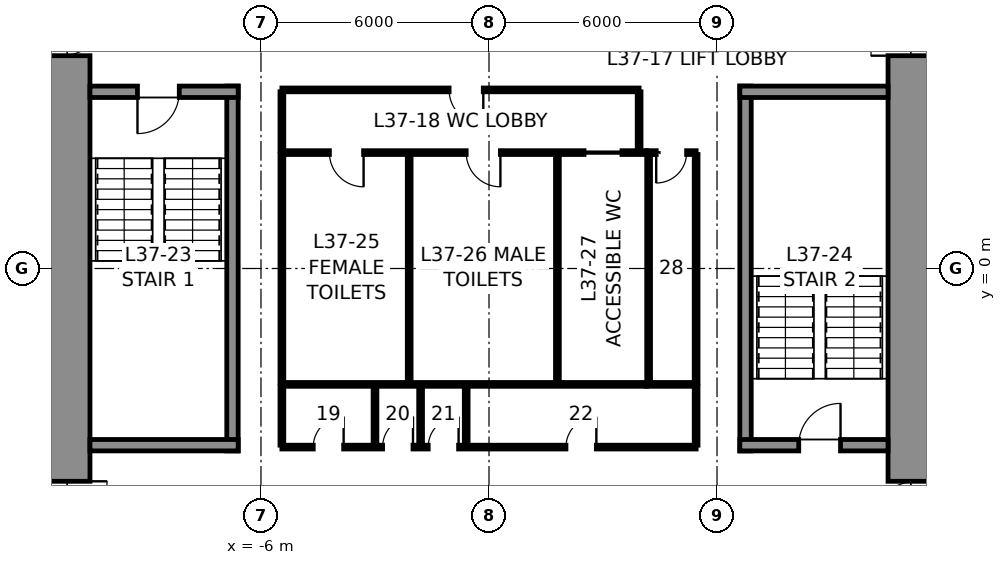
"""IFC4 building model, lengths in metres.
Left out: names, types, materials, properties, quantities, classifications, styles, units other than length and angle.
Written with IfcOpenShell. Run it as: python <this file> out.ifc"""

import sys

from ifc_helpers import new_model, si_unit, direction, frame, frame_2d, origin, place, context, subcontext, project, spatial, rectangle, extrude, element, fill, save


model = new_model("IFC4")
c1 = context("Model", 3, precision=1e-05, world=origin(), true_north=direction((0.0, 1.0)))
c2 = subcontext(c1, "Body", "Model", "MODEL_VIEW")
j1 = project(units=[si_unit("LENGTHUNIT", "METRE"), si_unit("PLANEANGLEUNIT", "RADIAN")], contexts=[c1])
p1 = place(None, origin())
s1 = spatial("IfcSite", under=j1, at=p1, CompositionType="ELEMENT")
p2 = place(p1, origin())
s2 = spatial("IfcBuilding", under=s1, at=p2, CompositionType="ELEMENT")
p3 = place(p2, frame((0.0, 0.0, 175.8)))
s3 = spatial("IfcBuildingStorey", under=s2, at=p3, CompositionType="ELEMENT", Elevation=175.8)
p4 = place(p3, frame((11.25, 10.5, 0.0), z_axis=(0.0, 0.0, 1.0), x_axis=(0.0, -1.0, 0.0)))
e1 = element("IfcWall", 1, at=p4, inside=s3, PredefinedType="SHEAR", context=c2, shape_type="SweptSolid", body=[
    extrude(rectangle(XDim=21.0, YDim=1.5, at=frame_2d((10.5, 0.0))), origin(), (0.0, 0.0, 1.0), 4.0),
])
p5 = place(p4, frame((3.7, 0.0, 0.0)))
e2 = element("IfcOpeningElement", 2, at=p5, cuts=e1, PredefinedType="OPENING", context=c2, shape_type="SweptSolid", body=[
    extrude(rectangle(XDim=1.2, YDim=2.3, at=frame_2d((0.6, 1.15))), frame((0.0, 0.76, 0.0), z_axis=(0.0, -1.0, 0.0), x_axis=(1.0, 0.0, 0.0)), (0.0, 0.0, 1.0), 1.52),
])
p6 = place(p4, frame((16.1, 0.0, 0.0)))
e3 = element("IfcOpeningElement", 3, at=p6, cuts=e1, PredefinedType="OPENING", context=c2, shape_type="SweptSolid", body=[
    extrude(rectangle(XDim=1.2, YDim=2.3, at=frame_2d((0.6, 1.15))), frame((0.0, 0.76, 0.0), z_axis=(0.0, -1.0, 0.0), x_axis=(1.0, 0.0, 0.0)), (0.0, 0.0, 1.0), 1.52),
])
p7 = place(p3, frame((-11.25, -10.5, 0.0), z_axis=(0.0, 0.0, 1.0), x_axis=(0.0, 1.0, 0.0)))
e4 = element("IfcWall", 4, at=p7, inside=s3, PredefinedType="SHEAR", context=c2, shape_type="SweptSolid", body=[
    extrude(rectangle(XDim=21.0, YDim=1.5, at=frame_2d((10.5, 0.0))), origin(), (0.0, 0.0, 1.0), 4.0),
])
p8 = place(p7, frame((16.1, 0.0, 0.0)))
e5 = element("IfcOpeningElement", 5, at=p8, cuts=e4, PredefinedType="OPENING", context=c2, shape_type="SweptSolid", body=[
    extrude(rectangle(XDim=1.2, YDim=2.3, at=frame_2d((0.6, 1.15))), frame((0.0, 0.76, 0.0), z_axis=(0.0, -1.0, 0.0), x_axis=(1.0, 0.0, 0.0)), (0.0, 0.0, 1.0), 1.52),
])
p9 = place(p7, frame((3.7, 0.0, 0.0)))
e6 = element("IfcOpeningElement", 6, at=p9, cuts=e4, PredefinedType="OPENING", context=c2, shape_type="SweptSolid", body=[
    extrude(rectangle(XDim=1.2, YDim=2.3, at=frame_2d((0.6, 1.15))), frame((0.0, 0.76, 0.0), z_axis=(0.0, -1.0, 0.0), x_axis=(1.0, 0.0, 0.0)), (0.0, 0.0, 1.0), 1.52),
])
p10 = place(p3, frame((-6.75, -4.8, 0.0), z_axis=(0.0, 0.0, 1.0), x_axis=(0.0, 1.0, 0.0)))
e7 = element("IfcWall", 7, at=p10, inside=s3, PredefinedType="SOLIDWALL", context=c2, shape_type="SweptSolid", body=[
    extrude(rectangle(XDim=9.6, YDim=0.3, at=frame_2d((4.8, 0.0))), origin(), (0.0, 0.0, 1.0), 3.75),
])
p11 = place(p3, frame((-10.5, 4.65, 0.0), z_axis=(0.0, 0.0, 1.0), x_axis=(1.0, 0.0, 0.0)))
e8 = element("IfcWall", 8, at=p11, inside=s3, PredefinedType="SOLIDWALL", context=c2, shape_type="SweptSolid", body=[
    extrude(rectangle(XDim=3.9, YDim=0.3, at=frame_2d((1.95, 0.0))), origin(), (0.0, 0.0, 1.0), 3.75),
])
p12 = place(p11, frame((1.25, 0.0, 0.0)))
e9 = element("IfcOpeningElement", 9, at=p12, cuts=e8, PredefinedType="OPENING", context=c2, shape_type="SweptSolid", body=[
    extrude(rectangle(XDim=1.1, YDim=2.3, at=frame_2d((0.55, 1.15))), frame((0.0, 0.16, 0.0), z_axis=(0.0, -1.0, 0.0), x_axis=(1.0, 0.0, 0.0)), (0.0, 0.0, 1.0), 0.32),
])
p13 = place(p3, frame((-6.6, -4.65, 0.0), z_axis=(0.0, 0.0, 1.0), x_axis=(-1.0, 0.0, 0.0)))
e10 = element("IfcWall", 10, at=p13, inside=s3, PredefinedType="SOLIDWALL", context=c2, shape_type="SweptSolid", body=[
    extrude(rectangle(XDim=3.9, YDim=0.3, at=frame_2d((1.95, 0.0))), origin(), (0.0, 0.0, 1.0), 3.75),
])
p14 = place(p3, frame((6.75, -4.8, 0.0), z_axis=(0.0, 0.0, 1.0), x_axis=(0.0, 1.0, 0.0)))
e11 = element("IfcWall", 11, at=p14, inside=s3, PredefinedType="SOLIDWALL", context=c2, shape_type="SweptSolid", body=[
    extrude(rectangle(XDim=9.6, YDim=0.3, at=frame_2d((4.8, 0.0))), origin(), (0.0, 0.0, 1.0), 3.75),
])
p15 = place(p3, frame((6.6, 4.65, 0.0), z_axis=(0.0, 0.0, 1.0), x_axis=(1.0, 0.0, 0.0)))
e12 = element("IfcWall", 12, at=p15, inside=s3, PredefinedType="SOLIDWALL", context=c2, shape_type="SweptSolid", body=[
    extrude(rectangle(XDim=3.9, YDim=0.3, at=frame_2d((1.95, 0.0))), origin(), (0.0, 0.0, 1.0), 3.75),
])
p16 = place(p3, frame((10.5, -4.65, 0.0), z_axis=(0.0, 0.0, 1.0), x_axis=(-1.0, 0.0, 0.0)))
e13 = element("IfcWall", 13, at=p16, inside=s3, PredefinedType="SOLIDWALL", context=c2, shape_type="SweptSolid", body=[
    extrude(rectangle(XDim=3.9, YDim=0.3, at=frame_2d((1.95, 0.0))), origin(), (0.0, 0.0, 1.0), 3.75),
])
p17 = place(p16, frame((1.25, 0.0, 0.0)))
e14 = element("IfcOpeningElement", 14, at=p17, cuts=e13, PredefinedType="OPENING", context=c2, shape_type="SweptSolid", body=[
    extrude(rectangle(XDim=1.1, YDim=2.3, at=frame_2d((0.55, 1.15))), frame((0.0, 0.16, 0.0), z_axis=(0.0, -1.0, 0.0), x_axis=(1.0, 0.0, 0.0)), (0.0, 0.0, 1.0), 0.32),
])
p18 = place(p3, frame((-5.45, 3.05, 0.0), z_axis=(0.0, 0.0, 1.0), x_axis=(1.0, 0.0, 0.0)))
e15 = element("IfcWall", 15, at=p18, inside=s3, PredefinedType="PARTITIONING", context=c2, shape_type="SweptSolid", body=[
    extrude(rectangle(XDim=9.6, YDim=0.1, at=frame_2d((4.8, 0.0))), origin(), (0.0, 0.0, 1.0), 3.75),
])
p19 = place(p18, frame((1.25, 0.0, 0.0)))
e16 = element("IfcOpeningElement", 16, at=p19, cuts=e15, PredefinedType="OPENING", context=c2, shape_type="SweptSolid", body=[
    extrude(rectangle(XDim=0.9, YDim=2.3, at=frame_2d((0.45, 1.15))), frame((0.0, 0.06, 0.0), z_axis=(0.0, -1.0, 0.0), x_axis=(1.0, 0.0, 0.0)), (0.0, 0.0, 1.0), 0.12),
])
p20 = place(p18, frame((4.85, 0.0, 0.0)))
e17 = element("IfcOpeningElement", 17, at=p20, cuts=e15, PredefinedType="OPENING", context=c2, shape_type="SweptSolid", body=[
    extrude(rectangle(XDim=0.9, YDim=2.3, at=frame_2d((0.45, 1.15))), frame((0.0, 0.06, 0.0), z_axis=(0.0, -1.0, 0.0), x_axis=(1.0, 0.0, 0.0)), (0.0, 0.0, 1.0), 0.12),
])
p21 = place(p18, frame((7.95, 0.0, 0.0)))
e18 = element("IfcOpeningElement", 18, at=p21, cuts=e15, PredefinedType="OPENING", context=c2, shape_type="SweptSolid", body=[
    extrude(rectangle(XDim=1.0, YDim=2.3, at=frame_2d((0.5, 1.15))), frame((0.0, 0.06, 0.0), z_axis=(0.0, -1.0, 0.0), x_axis=(1.0, 0.0, 0.0)), (0.0, 0.0, 1.0), 0.12),
])
p22 = place(p3, frame((4.15, 3.05, 0.0), z_axis=(0.0, 0.0, 1.0), x_axis=(1.0, 0.0, 0.0)))
e19 = element("IfcWall", 19, at=p22, inside=s3, PredefinedType="PARTITIONING", context=c2, shape_type="SweptSolid", body=[
    extrude(rectangle(XDim=1.3, YDim=0.1, at=frame_2d((0.65, 0.0))), origin(), (0.0, 0.0, 1.0), 3.75),
])
p23 = place(p22, frame((0.25, 0.0, 0.0)))
e20 = element("IfcOpeningElement", 20, at=p23, cuts=e19, PredefinedType="OPENING", context=c2, shape_type="SweptSolid", body=[
    extrude(rectangle(XDim=0.8, YDim=2.3, at=frame_2d((0.4, 1.15))), frame((0.0, 0.06, 0.0), z_axis=(0.0, -1.0, 0.0), x_axis=(1.0, 0.0, 0.0)), (0.0, 0.0, 1.0), 0.12),
])
p24 = place(p3, frame((4.15, -3.05, 0.0), z_axis=(0.0, 0.0, 1.0), x_axis=(-1.0, 0.0, 0.0)))
e21 = element("IfcWall", 21, at=p24, inside=s3, PredefinedType="PARTITIONING", context=c2, shape_type="SweptSolid", body=[
    extrude(rectangle(XDim=9.6, YDim=0.1, at=frame_2d((4.8, 0.0))), origin(), (0.0, 0.0, 1.0), 3.75),
])
p25 = place(p3, frame((5.45, -3.05, 0.0), z_axis=(0.0, 0.0, 1.0), x_axis=(-1.0, 0.0, 0.0)))
e22 = element("IfcWall", 22, at=p25, inside=s3, PredefinedType="PARTITIONING", context=c2, shape_type="SweptSolid", body=[
    extrude(rectangle(XDim=1.3, YDim=0.1, at=frame_2d((0.65, 0.0))), origin(), (0.0, 0.0, 1.0), 3.75),
])
for number, where, z_axis, x_axis in (
    (23, (5.45, 3.0, 0.0), (0.0, 0.0, 1.0), (0.0, -1.0, 0.0)),
    (24, (-5.45, -3.0, 0.0), (0.0, 0.0, 1.0), (0.0, 1.0, 0.0)),
    (25, (-2.1, -3.0, 0.0), (0.0, 0.0, 1.0), (0.0, 1.0, 0.0)),
    (26, (1.8, -3.0, 0.0), (0.0, 0.0, 1.0), (0.0, 1.0, 0.0)),
    (27, (4.2, -3.0, 0.0), (0.0, 0.0, 1.0), (0.0, 1.0, 0.0)),
):
    element("IfcWall", number, at=place(p3, frame(where, z_axis=z_axis, x_axis=x_axis)), inside=s3, PredefinedType="PARTITIONING", context=c2, shape_type="SweptSolid", body=[
        extrude(rectangle(XDim=6.0, YDim=0.1, at=frame_2d((3.0, 0.0))), origin(), (0.0, 0.0, 1.0), 3.75),
    ])
p26 = place(p3, frame((-5.45, 4.7, 0.0), z_axis=(0.0, 0.0, 1.0), x_axis=(1.0, 0.0, 0.0)))
e28 = element("IfcWall", 28, at=p26, inside=s3, PredefinedType="PARTITIONING", context=c2, shape_type="SweptSolid", body=[
    extrude(rectangle(XDim=9.4, YDim=0.1, at=frame_2d((4.7, 0.0))), origin(), (0.0, 0.0, 1.0), 3.75),
])
p27 = place(p26, frame((4.4, 0.0, 0.0)))
e29 = element("IfcOpeningElement", 29, at=p27, cuts=e28, PredefinedType="OPENING", context=c2, shape_type="SweptSolid", body=[
    extrude(rectangle(XDim=0.9, YDim=2.3, at=frame_2d((0.45, 1.15))), frame((0.0, 0.06, 0.0), z_axis=(0.0, -1.0, 0.0), x_axis=(1.0, 0.0, 0.0)), (0.0, 0.0, 1.0), 0.12),
])
for number, where, z_axis, x_axis in (
    (30, (-5.45, 3.1, 0.0), (0.0, 0.0, 1.0), (0.0, 1.0, 0.0)),
    (31, (3.95, 3.1, 0.0), (0.0, 0.0, 1.0), (0.0, 1.0, 0.0)),
):
    element("IfcWall", number, at=place(p3, frame(where, z_axis=z_axis, x_axis=x_axis)), inside=s3, PredefinedType="PARTITIONING", context=c2, shape_type="SweptSolid", body=[
        extrude(rectangle(XDim=1.55, YDim=0.1, at=frame_2d((0.775, 0.0))), origin(), (0.0, 0.0, 1.0), 3.75),
    ])
p28 = place(p3, frame((5.45, -4.7, 0.0), z_axis=(0.0, 0.0, 1.0), x_axis=(-1.0, 0.0, 0.0)))
e32 = element("IfcWall", 32, at=p28, inside=s3, PredefinedType="PARTITIONING", context=c2, shape_type="SweptSolid", body=[
    extrude(rectangle(XDim=10.9, YDim=0.1, at=frame_2d((5.45, 0.0))), origin(), (0.0, 0.0, 1.0), 3.75),
])
p29 = place(p28, frame((9.275, 0.0, 0.0)))
e33 = element("IfcOpeningElement", 33, at=p29, cuts=e32, PredefinedType="OPENING", context=c2, shape_type="SweptSolid", body=[
    extrude(rectangle(XDim=0.8, YDim=2.3, at=frame_2d((0.4, 1.15))), frame((0.0, 0.06, 0.0), z_axis=(0.0, -1.0, 0.0), x_axis=(1.0, 0.0, 0.0)), (0.0, 0.0, 1.0), 0.12),
])
p30 = place(p28, frame((7.45, 0.0, 0.0)))
e34 = element("IfcOpeningElement", 34, at=p30, cuts=e32, PredefinedType="OPENING", context=c2, shape_type="SweptSolid", body=[
    extrude(rectangle(XDim=0.8, YDim=2.3, at=frame_2d((0.4, 1.15))), frame((0.0, 0.06, 0.0), z_axis=(0.0, -1.0, 0.0), x_axis=(1.0, 0.0, 0.0)), (0.0, 0.0, 1.0), 0.12),
])
p31 = place(p28, frame((6.25, 0.0, 0.0)))
e35 = element("IfcOpeningElement", 35, at=p31, cuts=e32, PredefinedType="OPENING", context=c2, shape_type="SweptSolid", body=[
    extrude(rectangle(XDim=0.8, YDim=2.3, at=frame_2d((0.4, 1.15))), frame((0.0, 0.06, 0.0), z_axis=(0.0, -1.0, 0.0), x_axis=(1.0, 0.0, 0.0)), (0.0, 0.0, 1.0), 0.12),
])
p32 = place(p28, frame((2.625, 0.0, 0.0)))
e36 = element("IfcOpeningElement", 36, at=p32, cuts=e32, PredefinedType="OPENING", context=c2, shape_type="SweptSolid", body=[
    extrude(rectangle(XDim=0.8, YDim=2.3, at=frame_2d((0.4, 1.15))), frame((0.0, 0.06, 0.0), z_axis=(0.0, -1.0, 0.0), x_axis=(1.0, 0.0, 0.0)), (0.0, 0.0, 1.0), 0.12),
])
for number, where, z_axis, x_axis in (
    (37, (-5.45, -3.1, 0.0), (0.0, 0.0, 1.0), (0.0, -1.0, 0.0)),
    (38, (5.45, -3.1, 0.0), (0.0, 0.0, 1.0), (0.0, -1.0, 0.0)),
    (39, (-3.0, -3.1, 0.0), (0.0, 0.0, 1.0), (0.0, -1.0, 0.0)),
    (40, (-1.8, -3.1, 0.0), (0.0, 0.0, 1.0), (0.0, -1.0, 0.0)),
    (41, (-0.6, -3.1, 0.0), (0.0, 0.0, 1.0), (0.0, -1.0, 0.0)),
):
    element("IfcWall", number, at=place(p3, frame(where, z_axis=z_axis, x_axis=x_axis)), inside=s3, PredefinedType="PARTITIONING", context=c2, shape_type="SweptSolid", body=[
        extrude(rectangle(XDim=1.55, YDim=0.1, at=frame_2d((0.775, 0.0))), origin(), (0.0, 0.0, 1.0), 3.75),
    ])
p33 = place(p12, frame((1.1, 0.0, 0.0), z_axis=(0.0, 0.0, 1.0), x_axis=(-1.0, 0.0, 0.0)))
e42 = element("IfcDoor", 42, at=p33, inside=s3, OperationType="SINGLE_SWING_RIGHT", PredefinedType="DOOR", context=c2, shape_type="SweptSolid", body=[
    extrude(rectangle(XDim=1.1, YDim=2.3, at=frame_2d((0.55, 1.15))), frame((0.0, 0.025, 0.0), z_axis=(0.0, -1.0, 0.0), x_axis=(1.0, 0.0, 0.0)), (0.0, 0.0, 1.0), 0.05),
])
fill(e9, e42)
p34 = place(p17, frame((1.1, 0.0, 0.0), z_axis=(0.0, 0.0, 1.0), x_axis=(-1.0, 0.0, 0.0)))
e43 = element("IfcDoor", 43, at=p34, inside=s3, OperationType="SINGLE_SWING_RIGHT", PredefinedType="DOOR", context=c2, shape_type="SweptSolid", body=[
    extrude(rectangle(XDim=1.1, YDim=2.3, at=frame_2d((0.55, 1.15))), frame((0.0, 0.025, 0.0), z_axis=(0.0, -1.0, 0.0), x_axis=(1.0, 0.0, 0.0)), (0.0, 0.0, 1.0), 0.05),
])
fill(e14, e43)
p35 = place(p19, frame((0.9, 0.0, 0.0), z_axis=(0.0, 0.0, 1.0), x_axis=(-1.0, 0.0, 0.0)))
e44 = element("IfcDoor", 44, at=p35, inside=s3, OperationType="SINGLE_SWING_LEFT", PredefinedType="DOOR", context=c2, shape_type="SweptSolid", body=[
    extrude(rectangle(XDim=0.9, YDim=2.3, at=frame_2d((0.45, 1.15))), frame((0.0, 0.025, 0.0), z_axis=(0.0, -1.0, 0.0), x_axis=(1.0, 0.0, 0.0)), (0.0, 0.0, 1.0), 0.05),
])
fill(e16, e44)
p36 = place(p20, frame((0.9, 0.0, 0.0), z_axis=(0.0, 0.0, 1.0), x_axis=(-1.0, 0.0, 0.0)))
e45 = element("IfcDoor", 45, at=p36, inside=s3, OperationType="SINGLE_SWING_LEFT", PredefinedType="DOOR", context=c2, shape_type="SweptSolid", body=[
    extrude(rectangle(XDim=0.9, YDim=2.3, at=frame_2d((0.45, 1.15))), frame((0.0, 0.025, 0.0), z_axis=(0.0, -1.0, 0.0), x_axis=(1.0, 0.0, 0.0)), (0.0, 0.0, 1.0), 0.05),
])
fill(e17, e45)
p37 = place(p21, frame((1.0, 0.0, 0.0), z_axis=(0.0, 0.0, 1.0), x_axis=(-1.0, 0.0, 0.0)))
e46 = element("IfcDoor", 46, at=p37, inside=s3, OperationType="SLIDING_TO_LEFT", PredefinedType="DOOR", context=c2, shape_type="SweptSolid", body=[
    extrude(rectangle(XDim=1.0, YDim=2.3, at=frame_2d((0.5, 1.15))), frame((0.0, 0.025, 0.0), z_axis=(0.0, -1.0, 0.0), x_axis=(1.0, 0.0, 0.0)), (0.0, 0.0, 1.0), 0.05),
])
fill(e18, e46)
p38 = place(p23, frame((0.8, 0.0, 0.0), z_axis=(0.0, 0.0, 1.0), x_axis=(-1.0, 0.0, 0.0)))
e47 = element("IfcDoor", 47, at=p38, inside=s3, OperationType="SINGLE_SWING_RIGHT", PredefinedType="DOOR", context=c2, shape_type="SweptSolid", body=[
    extrude(rectangle(XDim=0.8, YDim=2.3, at=frame_2d((0.4, 1.15))), frame((0.0, 0.025, 0.0), z_axis=(0.0, -1.0, 0.0), x_axis=(1.0, 0.0, 0.0)), (0.0, 0.0, 1.0), 0.05),
])
fill(e20, e47)
p39 = place(p27, frame((0.9, 0.0, 0.0), z_axis=(0.0, 0.0, 1.0), x_axis=(-1.0, 0.0, 0.0)))
e48 = element("IfcDoor", 48, at=p39, inside=s3, OperationType="SINGLE_SWING_LEFT", PredefinedType="DOOR", context=c2, shape_type="SweptSolid", body=[
    extrude(rectangle(XDim=0.9, YDim=2.3, at=frame_2d((0.45, 1.15))), frame((0.0, 0.025, 0.0), z_axis=(0.0, -1.0, 0.0), x_axis=(1.0, 0.0, 0.0)), (0.0, 0.0, 1.0), 0.05),
])
fill(e29, e48)
p40 = place(p29, frame((0.8, 0.0, 0.0), z_axis=(0.0, 0.0, 1.0), x_axis=(-1.0, 0.0, 0.0)))
e49 = element("IfcDoor", 49, at=p40, inside=s3, OperationType="SINGLE_SWING_RIGHT", PredefinedType="DOOR", context=c2, shape_type="SweptSolid", body=[
    extrude(rectangle(XDim=0.8, YDim=2.3, at=frame_2d((0.4, 1.15))), frame((0.0, 0.025, 0.0), z_axis=(0.0, -1.0, 0.0), x_axis=(1.0, 0.0, 0.0)), (0.0, 0.0, 1.0), 0.05),
])
fill(e33, e49)
p41 = place(p30, frame((0.8, 0.0, 0.0), z_axis=(0.0, 0.0, 1.0), x_axis=(-1.0, 0.0, 0.0)))
e50 = element("IfcDoor", 50, at=p41, inside=s3, OperationType="SINGLE_SWING_RIGHT", PredefinedType="DOOR", context=c2, shape_type="SweptSolid", body=[
    extrude(rectangle(XDim=0.8, YDim=2.3, at=frame_2d((0.4, 1.15))), frame((0.0, 0.025, 0.0), z_axis=(0.0, -1.0, 0.0), x_axis=(1.0, 0.0, 0.0)), (0.0, 0.0, 1.0), 0.05),
])
fill(e34, e50)
p42 = place(p31, frame((0.8, 0.0, 0.0), z_axis=(0.0, 0.0, 1.0), x_axis=(-1.0, 0.0, 0.0)))
e51 = element("IfcDoor", 51, at=p42, inside=s3, OperationType="SINGLE_SWING_RIGHT", PredefinedType="DOOR", context=c2, shape_type="SweptSolid", body=[
    extrude(rectangle(XDim=0.8, YDim=2.3, at=frame_2d((0.4, 1.15))), frame((0.0, 0.025, 0.0), z_axis=(0.0, -1.0, 0.0), x_axis=(1.0, 0.0, 0.0)), (0.0, 0.0, 1.0), 0.05),
])
fill(e35, e51)
p43 = place(p32, frame((0.8, 0.0, 0.0), z_axis=(0.0, 0.0, 1.0), x_axis=(-1.0, 0.0, 0.0)))
e52 = element("IfcDoor", 52, at=p43, inside=s3, OperationType="SINGLE_SWING_RIGHT", PredefinedType="DOOR", context=c2, shape_type="SweptSolid", body=[
    extrude(rectangle(XDim=0.8, YDim=2.3, at=frame_2d((0.4, 1.15))), frame((0.0, 0.025, 0.0), z_axis=(0.0, -1.0, 0.0), x_axis=(1.0, 0.0, 0.0)), (0.0, 0.0, 1.0), 0.05),
])
fill(e36, e52)
p44 = place(p8, frame((1.2, 0.0, 0.0), z_axis=(0.0, 0.0, 1.0), x_axis=(-1.0, 0.0, 0.0)))
e53 = element("IfcDoor", 53, at=p44, inside=s3, OperationType="SINGLE_SWING_LEFT", PredefinedType="DOOR", context=c2, shape_type="SweptSolid", body=[
    extrude(rectangle(XDim=1.2, YDim=2.3, at=frame_2d((0.6, 1.15))), frame((0.0, 0.025, 0.0), z_axis=(0.0, -1.0, 0.0), x_axis=(1.0, 0.0, 0.0)), (0.0, 0.0, 1.0), 0.05),
])
fill(e5, e53)
p45 = place(p9, frame((1.2, 0.0, 0.0), z_axis=(0.0, 0.0, 1.0), x_axis=(-1.0, 0.0, 0.0)))
e54 = element("IfcDoor", 54, at=p45, inside=s3, OperationType="SINGLE_SWING_LEFT", PredefinedType="DOOR", context=c2, shape_type="SweptSolid", body=[
    extrude(rectangle(XDim=1.2, YDim=2.3, at=frame_2d((0.6, 1.15))), frame((0.0, 0.025, 0.0), z_axis=(0.0, -1.0, 0.0), x_axis=(1.0, 0.0, 0.0)), (0.0, 0.0, 1.0), 0.05),
])
fill(e6, e54)
p46 = place(p5, frame((1.2, 0.0, 0.0), z_axis=(0.0, 0.0, 1.0), x_axis=(-1.0, 0.0, 0.0)))
e55 = element("IfcDoor", 55, at=p46, inside=s3, OperationType="SINGLE_SWING_LEFT", PredefinedType="DOOR", context=c2, shape_type="SweptSolid", body=[
    extrude(rectangle(XDim=1.2, YDim=2.3, at=frame_2d((0.6, 1.15))), frame((0.0, 0.025, 0.0), z_axis=(0.0, -1.0, 0.0), x_axis=(1.0, 0.0, 0.0)), (0.0, 0.0, 1.0), 0.05),
])
fill(e2, e55)
p47 = place(p6, frame((1.2, 0.0, 0.0), z_axis=(0.0, 0.0, 1.0), x_axis=(-1.0, 0.0, 0.0)))
e56 = element("IfcDoor", 56, at=p47, inside=s3, OperationType="SINGLE_SWING_LEFT", PredefinedType="DOOR", context=c2, shape_type="SweptSolid", body=[
    extrude(rectangle(XDim=1.2, YDim=2.3, at=frame_2d((0.6, 1.15))), frame((0.0, 0.025, 0.0), z_axis=(0.0, -1.0, 0.0), x_axis=(1.0, 0.0, 0.0)), (0.0, 0.0, 1.0), 0.05),
])
fill(e3, e56)
save(model, sys.argv[1])
